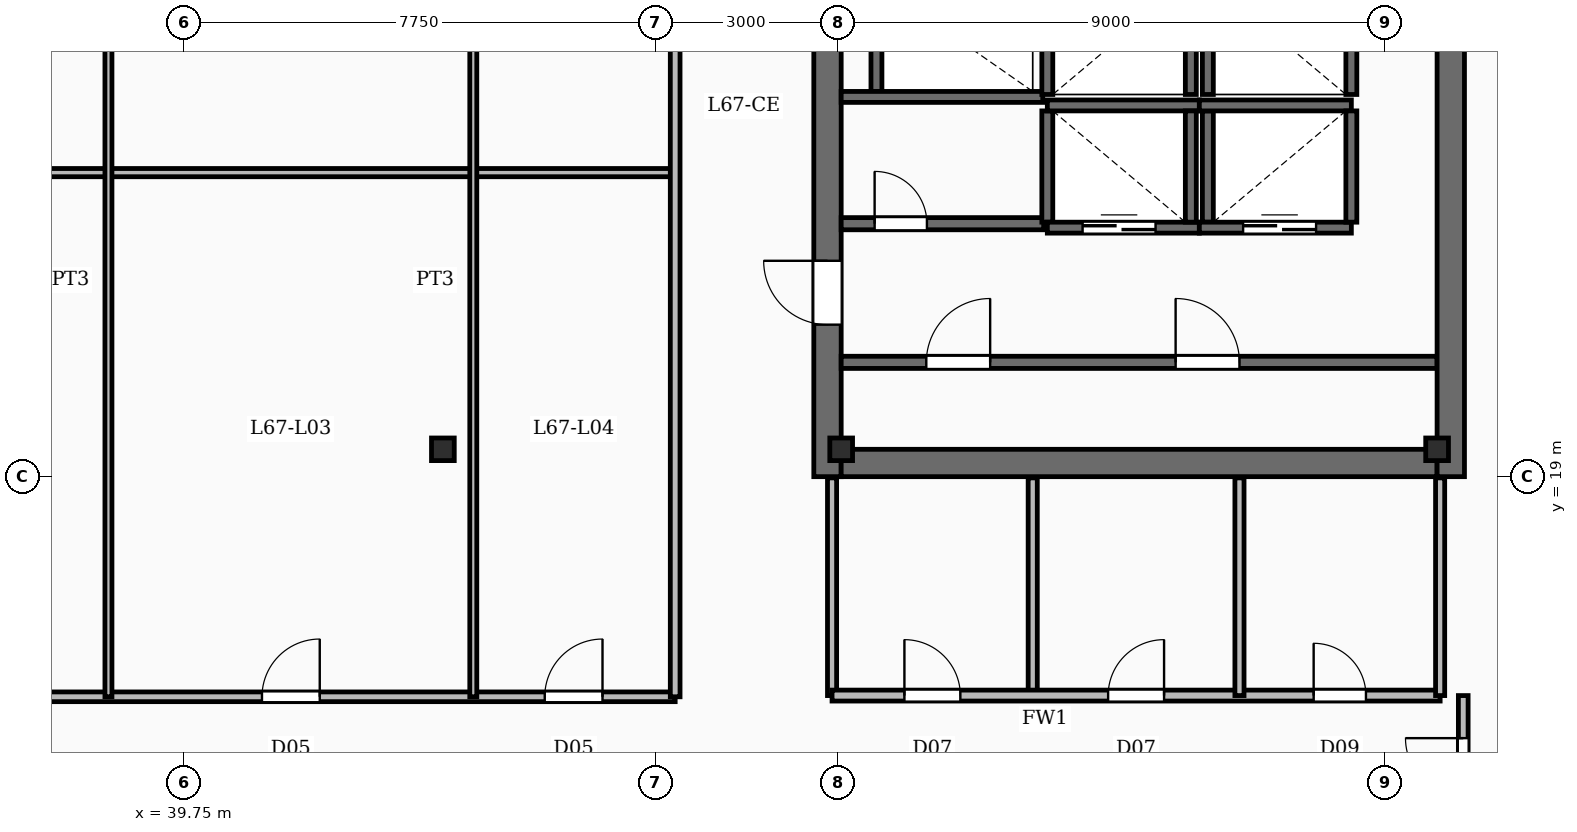
"""IFC4 building model, lengths in metres.
Left out: names, types, materials, properties, quantities, classifications, styles, units other than length and angle.
Written with IfcOpenShell. Run it as: python <this file> out.ifc"""

import sys

from ifc_helpers import new_model, si_unit, direction, frame, frame_2d, origin, origin_2d, place, context, subcontext, project, spatial, rectangle, i_section, extrude, element, fill, save


model = new_model("IFC4")
c1 = context("Model", 3, precision=1e-05, world=origin(), true_north=direction((0.0, 1.0)))
c2 = subcontext(c1, "Body", "Model", "MODEL_VIEW")
j1 = project(units=[si_unit("LENGTHUNIT", "METRE"), si_unit("PLANEANGLEUNIT", "RADIAN")], contexts=[c1])
p1 = place(None, origin())
s1 = spatial("IfcSite", under=j1, at=p1, CompositionType="ELEMENT")
p2 = place(p1, origin())
s2 = spatial("IfcBuilding", under=s1, at=p2, CompositionType="ELEMENT")
p3 = place(p2, frame((0.0, 0.0, 274.9)))
s3 = spatial("IfcBuildingStorey", under=s2, at=p3, CompositionType="ELEMENT", Elevation=274.9)
p4 = place(p3, frame((50.325, 19.0, -0.45), z_axis=(0.0, 0.0, 1.0), x_axis=(0.0, 1.0, 0.0)))
e1 = element("IfcWall", 1, at=p4, inside=s3, PredefinedType="SHEAR", context=c2, shape_type="SweptSolid", body=[
    extrude(rectangle(XDim=20.8, YDim=0.45, at=frame_2d((10.4, 0.0))), origin(), (0.0, 0.0, 1.0), 3.93),
])
p5 = place(p4, frame((2.5, 0.0, 0.45)))
e2 = element("IfcOpeningElement", 2, at=p5, cuts=e1, PredefinedType="OPENING", context=c2, shape_type="SweptSolid", body=[
    extrude(rectangle(XDim=1.05, YDim=2.15, at=frame_2d((0.525, 1.075))), frame((0.0, 0.235, 0.0), z_axis=(0.0, -1.0, 0.0), x_axis=(1.0, 0.0, 0.0)), (0.0, 0.0, 1.0), 0.47),
])
p6 = place(p4, frame((8.65, 0.0, 0.45)))
e3 = element("IfcOpeningElement", 3, at=p6, cuts=e1, PredefinedType="OPENING", context=c2, shape_type="SweptSolid", body=[
    extrude(rectangle(XDim=1.05, YDim=2.15, at=frame_2d((0.525, 1.075))), frame((0.0, 0.235, 0.0), z_axis=(0.0, -1.0, 0.0), x_axis=(1.0, 0.0, 0.0)), (0.0, 0.0, 1.0), 0.47),
])
p7 = place(p4, frame((14.62, 0.0, 0.45)))
e4 = element("IfcOpeningElement", 4, at=p7, cuts=e1, PredefinedType="OPENING", context=c2, shape_type="SweptSolid", body=[
    extrude(rectangle(XDim=1.1, YDim=2.15, at=frame_2d((0.55, 1.075))), frame((0.0, 0.235, 0.0), z_axis=(0.0, -1.0, 0.0), x_axis=(1.0, 0.0, 0.0)), (0.0, 0.0, 1.0), 0.47),
])
p8 = place(p3, frame((60.575, 19.0, -0.45), z_axis=(0.0, 0.0, 1.0), x_axis=(0.0, 1.0, 0.0)))
e5 = element("IfcWall", 5, at=p8, inside=s3, PredefinedType="SHEAR", context=c2, shape_type="SweptSolid", body=[
    extrude(rectangle(XDim=20.8, YDim=0.45, at=frame_2d((10.4, 0.0))), origin(), (0.0, 0.0, 1.0), 3.93),
])
p9 = place(p3, frame((50.55, 19.225, -0.45), z_axis=(0.0, 0.0, 1.0), x_axis=(1.0, 0.0, 0.0)))
e6 = element("IfcWall", 6, at=p9, inside=s3, PredefinedType="SHEAR", context=c2, shape_type="SweptSolid", body=[
    extrude(rectangle(XDim=9.8, YDim=0.45, at=frame_2d((4.9, 0.0))), origin(), (0.0, 0.0, 1.0), 3.93),
])
for number, where, z_axis, x_axis in (
    (7, (50.55, 19.45, -0.45), (0.0, 0.0, 1.0), (1.0, 0.0, 0.0)),
    (8, (60.35, 19.45, -0.45), (0.0, 0.0, 1.0), (1.0, 0.0, 0.0)),
    (9, (44.0, 19.45, -0.45), (0.0, 0.0, 1.0), (1.0, 0.0, 0.0)),
):
    element("IfcColumn", number, at=place(p3, frame(where, z_axis=z_axis, x_axis=x_axis)), inside=s3, PredefinedType="COLUMN", context=c2, shape_type="SweptSolid", body=[
        extrude(i_section(OverallWidth=0.374, OverallDepth=0.372, WebThickness=0.016, FlangeThickness=0.026, FilletRadius=0.02, at=origin_2d()), origin(), (0.0, 0.0, 1.0), 3.93),
    ])
p10 = place(p3, frame((53.94, 25.105, 0.0), z_axis=(0.0, 0.0, 1.0), x_axis=(1.0, 0.0, 0.0)))
e10 = element("IfcWall", 10, at=p10, inside=s3, PredefinedType="SOLIDWALL", context=c2, shape_type="SweptSolid", body=[
    extrude(rectangle(XDim=2.5, YDim=0.18, at=frame_2d((1.25, 0.0))), origin(), (0.0, 0.0, 1.0), 3.48),
])
p11 = place(p3, frame((53.94, 23.095, 0.0), z_axis=(0.0, 0.0, 1.0), x_axis=(1.0, 0.0, 0.0)))
e11 = element("IfcWall", 11, at=p11, inside=s3, PredefinedType="SOLIDWALL", context=c2, shape_type="SweptSolid", body=[
    extrude(rectangle(XDim=2.5, YDim=0.18, at=frame_2d((1.25, 0.0))), origin(), (0.0, 0.0, 1.0), 3.48),
])
p12 = place(p11, frame((0.58, 0.0, 0.0)))
e12 = element("IfcOpeningElement", 12, at=p12, cuts=e11, PredefinedType="OPENING", context=c2, shape_type="SweptSolid", body=[
    extrude(rectangle(XDim=1.2, YDim=2.2, at=frame_2d((0.6, 1.1))), frame((0.0, 0.1, 0.0), z_axis=(0.0, -1.0, 0.0), x_axis=(1.0, 0.0, 0.0)), (0.0, 0.0, 1.0), 0.2),
])
for number, where, z_axis, x_axis in (
    (13, (53.94, 23.185, 0.0), (0.0, 0.0, 1.0), (0.0, 1.0, 0.0)),
    (14, (56.3, 23.185, 0.0), (0.0, 0.0, 1.0), (0.0, 1.0, 0.0)),
):
    element("IfcWall", number, at=place(p3, frame(where, z_axis=z_axis, x_axis=x_axis)), inside=s3, PredefinedType="SOLIDWALL", context=c2, shape_type="SweptSolid", body=[
        extrude(rectangle(XDim=1.83, YDim=0.18, at=frame_2d((0.915, 0.0))), origin(), (0.0, 0.0, 1.0), 3.48),
    ])
p13 = place(p3, frame((56.44, 25.105, 0.0), z_axis=(0.0, 0.0, 1.0), x_axis=(1.0, 0.0, 0.0)))
e15 = element("IfcWall", 15, at=p13, inside=s3, PredefinedType="SOLIDWALL", context=c2, shape_type="SweptSolid", body=[
    extrude(rectangle(XDim=2.5, YDim=0.18, at=frame_2d((1.25, 0.0))), origin(), (0.0, 0.0, 1.0), 3.48),
])
p14 = place(p3, frame((56.44, 23.095, 0.0), z_axis=(0.0, 0.0, 1.0), x_axis=(1.0, 0.0, 0.0)))
e16 = element("IfcWall", 16, at=p14, inside=s3, PredefinedType="SOLIDWALL", context=c2, shape_type="SweptSolid", body=[
    extrude(rectangle(XDim=2.5, YDim=0.18, at=frame_2d((1.25, 0.0))), origin(), (0.0, 0.0, 1.0), 3.48),
])
p15 = place(p14, frame((0.72, 0.0, 0.0)))
e17 = element("IfcOpeningElement", 17, at=p15, cuts=e16, PredefinedType="OPENING", context=c2, shape_type="SweptSolid", body=[
    extrude(rectangle(XDim=1.2, YDim=2.2, at=frame_2d((0.6, 1.1))), frame((0.0, 0.1, 0.0), z_axis=(0.0, -1.0, 0.0), x_axis=(1.0, 0.0, 0.0)), (0.0, 0.0, 1.0), 0.2),
])
for number, where, z_axis, x_axis in (
    (18, (56.58, 23.185, 0.0), (0.0, 0.0, 1.0), (0.0, 1.0, 0.0)),
    (19, (58.94, 23.185, 0.0), (0.0, 0.0, 1.0), (0.0, 1.0, 0.0)),
):
    element("IfcWall", number, at=place(p3, frame(where, z_axis=z_axis, x_axis=x_axis)), inside=s3, PredefinedType="SOLIDWALL", context=c2, shape_type="SweptSolid", body=[
        extrude(rectangle(XDim=1.83, YDim=0.18, at=frame_2d((0.915, 0.0))), origin(), (0.0, 0.0, 1.0), 3.48),
    ])
for number, where, z_axis, x_axis in (
    (20, (53.94, 25.285, 0.0), (0.0, 0.0, 1.0), (0.0, 1.0, 0.0)),
    (21, (56.3, 25.285, 0.0), (0.0, 0.0, 1.0), (0.0, 1.0, 0.0)),
    (22, (56.58, 25.285, 0.0), (0.0, 0.0, 1.0), (0.0, 1.0, 0.0)),
    (23, (58.94, 25.285, 0.0), (0.0, 0.0, 1.0), (0.0, 1.0, 0.0)),
):
    element("IfcWall", number, at=place(p3, frame(where, z_axis=z_axis, x_axis=x_axis)), inside=s3, PredefinedType="SOLIDWALL", context=c2, shape_type="SweptSolid", body=[
        extrude(rectangle(XDim=1.83, YDim=0.18, at=frame_2d((0.915, 0.0))), origin(), (0.0, 0.0, 1.0), 3.48),
    ])
p16 = place(p3, frame((50.55, 25.245, 0.0), z_axis=(0.0, 0.0, 1.0), x_axis=(1.0, 0.0, 0.0)))
e24 = element("IfcWall", 24, at=p16, inside=s3, PredefinedType="SOLIDWALL", context=c2, shape_type="SweptSolid", body=[
    extrude(rectangle(XDim=3.315, YDim=0.18, at=frame_2d((1.657, 0.0))), origin(), (0.0, 0.0, 1.0), 3.48),
])
p17 = place(p3, frame((51.13, 25.335, 0.0), z_axis=(0.0, 0.0, 1.0), x_axis=(0.0, 1.0, 0.0)))
e25 = element("IfcWall", 25, at=p17, inside=s3, PredefinedType="SOLIDWALL", context=c2, shape_type="SweptSolid", body=[
    extrude(rectangle(XDim=1.73, YDim=0.18, at=frame_2d((0.865, 0.0))), origin(), (0.0, 0.0, 1.0), 3.48),
])
p18 = place(p3, frame((50.55, 20.88, 0.0), z_axis=(0.0, 0.0, 1.0), x_axis=(1.0, 0.0, 0.0)))
e26 = element("IfcWall", 26, at=p18, inside=s3, PredefinedType="SOLIDWALL", context=c2, shape_type="SweptSolid", body=[
    extrude(rectangle(XDim=9.8, YDim=0.2, at=frame_2d((4.9, 0.0))), origin(), (0.0, 0.0, 1.0), 2.54),
])
p19 = place(p18, frame((1.4, 0.0, 0.0)))
e27 = element("IfcOpeningElement", 27, at=p19, cuts=e26, PredefinedType="OPENING", context=c2, shape_type="SweptSolid", body=[
    extrude(rectangle(XDim=1.05, YDim=2.15, at=frame_2d((0.525, 1.075))), frame((0.0, 0.11, 0.0), z_axis=(0.0, -1.0, 0.0), x_axis=(1.0, 0.0, 0.0)), (0.0, 0.0, 1.0), 0.22),
])
p20 = place(p18, frame((5.5, 0.0, 0.0)))
e28 = element("IfcOpeningElement", 28, at=p20, cuts=e26, PredefinedType="OPENING", context=c2, shape_type="SweptSolid", body=[
    extrude(rectangle(XDim=1.05, YDim=2.15, at=frame_2d((0.525, 1.075))), frame((0.0, 0.11, 0.0), z_axis=(0.0, -1.0, 0.0), x_axis=(1.0, 0.0, 0.0)), (0.0, 0.0, 1.0), 0.22),
])
p21 = place(p3, frame((50.55, 23.16, 0.0), z_axis=(0.0, 0.0, 1.0), x_axis=(1.0, 0.0, 0.0)))
e29 = element("IfcWall", 29, at=p21, inside=s3, PredefinedType="SOLIDWALL", context=c2, shape_type="SweptSolid", body=[
    extrude(rectangle(XDim=3.33, YDim=0.2, at=frame_2d((1.665, 0.0))), origin(), (0.0, 0.0, 1.0), 2.54),
])
p22 = place(p21, frame((0.55, 0.0, 0.0)))
e30 = element("IfcOpeningElement", 30, at=p22, cuts=e29, PredefinedType="OPENING", context=c2, shape_type="SweptSolid", body=[
    extrude(rectangle(XDim=0.86, YDim=2.05, at=frame_2d((0.43, 1.025))), frame((0.0, 0.11, 0.0), z_axis=(0.0, -1.0, 0.0), x_axis=(1.0, 0.0, 0.0)), (0.0, 0.0, 1.0), 0.22),
])
for number, where, z_axis, x_axis in (
    (31, (53.7, 15.4, 0.0), (0.0, 0.0, 1.0), (0.0, 1.0, 0.0)),
    (32, (57.1, 15.4, 0.0), (0.0, 0.0, 1.0), (0.0, 1.0, 0.0)),
):
    element("IfcWall", number, at=place(p3, frame(where, z_axis=z_axis, x_axis=x_axis)), inside=s3, PredefinedType="PARTITIONING", context=c2, shape_type="SweptSolid", body=[
        extrude(rectangle(XDim=3.58, YDim=0.15, at=frame_2d((1.79, 0.0))), origin(), (0.0, 0.0, 1.0), 2.54),
    ])
p23 = place(p3, frame((50.4, 15.4, 0.0), z_axis=(0.0, 0.0, 1.0), x_axis=(1.0, 0.0, 0.0)))
e33 = element("IfcWall", 33, at=p23, inside=s3, PredefinedType="SOLIDWALL", context=c2, shape_type="SweptSolid", body=[
    extrude(rectangle(XDim=10.0, YDim=0.18, at=frame_2d((5.0, 0.0))), origin(), (0.0, 0.0, 1.0), 2.54),
])
p24 = place(p23, frame((1.19, 0.0, 0.0)))
e34 = element("IfcOpeningElement", 34, at=p24, cuts=e33, PredefinedType="OPENING", context=c2, shape_type="SweptSolid", body=[
    extrude(rectangle(XDim=0.92, YDim=2.1, at=frame_2d((0.46, 1.05))), frame((0.0, 0.1, 0.0), z_axis=(0.0, -1.0, 0.0), x_axis=(1.0, 0.0, 0.0)), (0.0, 0.0, 1.0), 0.2),
])
p25 = place(p23, frame((4.54, 0.0, 0.0)))
e35 = element("IfcOpeningElement", 35, at=p25, cuts=e33, PredefinedType="OPENING", context=c2, shape_type="SweptSolid", body=[
    extrude(rectangle(XDim=0.92, YDim=2.1, at=frame_2d((0.46, 1.05))), frame((0.0, 0.1, 0.0), z_axis=(0.0, -1.0, 0.0), x_axis=(1.0, 0.0, 0.0)), (0.0, 0.0, 1.0), 0.2),
])
p26 = place(p23, frame((7.92, 0.0, 0.0)))
e36 = element("IfcOpeningElement", 36, at=p26, cuts=e33, PredefinedType="OPENING", context=c2, shape_type="SweptSolid", body=[
    extrude(rectangle(XDim=0.86, YDim=2.05, at=frame_2d((0.43, 1.025))), frame((0.0, 0.1, 0.0), z_axis=(0.0, -1.0, 0.0), x_axis=(1.0, 0.0, 0.0)), (0.0, 0.0, 1.0), 0.2),
])
for number, where, z_axis, x_axis in (
    (37, (50.4, 15.4, 0.0), (0.0, 0.0, 1.0), (0.0, 1.0, 0.0)),
    (38, (60.4, 15.4, 0.0), (0.0, 0.0, 1.0), (0.0, 1.0, 0.0)),
):
    element("IfcWall", number, at=place(p3, frame(where, z_axis=z_axis, x_axis=x_axis)), inside=s3, PredefinedType="PARTITIONING", context=c2, shape_type="SweptSolid", body=[
        extrude(rectangle(XDim=3.58, YDim=0.15, at=frame_2d((1.79, 0.0))), origin(), (0.0, 0.0, 1.0), 2.54),
    ])
for number, where, z_axis, x_axis in (
    (39, (38.5, 15.38, 0.0), (0.0, 0.0, 1.0), (0.0, 1.0, 0.0)),
    (40, (44.5, 15.38, 0.0), (0.0, 0.0, 1.0), (0.0, 1.0, 0.0)),
):
    element("IfcWall", number, at=place(p3, frame(where, z_axis=z_axis, x_axis=x_axis)), inside=s3, PredefinedType="PARTITIONING", context=c2, shape_type="SweptSolid", body=[
        extrude(rectangle(XDim=19.6, YDim=0.115, at=frame_2d((9.8, 0.0))), origin(), (0.0, 0.0, 1.0), 2.54),
    ])
p27 = place(p3, frame((27.08, 24.0, 0.0), z_axis=(0.0, 0.0, 1.0), x_axis=(1.0, 0.0, 0.0)))
e41 = element("IfcWall", 41, at=p27, inside=s3, PredefinedType="PARTITIONING", context=c2, shape_type="SweptSolid", body=[
    extrude(rectangle(XDim=20.74, YDim=0.135, at=frame_2d((10.37, 0.0))), origin(), (0.0, 0.0, 1.0), 2.54),
])
p28 = place(p3, frame((27.08, 15.38, 0.0), z_axis=(0.0, 0.0, 1.0), x_axis=(1.0, 0.0, 0.0)))
e42 = element("IfcWall", 42, at=p28, inside=s3, PredefinedType="PARTITIONING", context=c2, shape_type="SweptSolid", body=[
    extrude(rectangle(XDim=20.74, YDim=0.16, at=frame_2d((10.37, 0.0))), origin(), (0.0, 0.0, 1.0), 2.54),
])
p29 = place(p28, frame((0.995, 0.0, 0.0)))
e43 = element("IfcOpeningElement", 43, at=p29, cuts=e42, PredefinedType="OPENING", context=c2, shape_type="SweptSolid", body=[
    extrude(rectangle(XDim=0.95, YDim=2.15, at=frame_2d((0.475, 1.075))), frame((0.0, 0.09, 0.0), z_axis=(0.0, -1.0, 0.0), x_axis=(1.0, 0.0, 0.0)), (0.0, 0.0, 1.0), 0.18),
])
p30 = place(p28, frame((6.695, 0.0, 0.0)))
e44 = element("IfcOpeningElement", 44, at=p30, cuts=e42, PredefinedType="OPENING", context=c2, shape_type="SweptSolid", body=[
    extrude(rectangle(XDim=0.95, YDim=2.15, at=frame_2d((0.475, 1.075))), frame((0.0, 0.09, 0.0), z_axis=(0.0, -1.0, 0.0), x_axis=(1.0, 0.0, 0.0)), (0.0, 0.0, 1.0), 0.18),
])
p31 = place(p28, frame((13.945, 0.0, 0.0)))
e45 = element("IfcOpeningElement", 45, at=p31, cuts=e42, PredefinedType="OPENING", context=c2, shape_type="SweptSolid", body=[
    extrude(rectangle(XDim=0.95, YDim=2.15, at=frame_2d((0.475, 1.075))), frame((0.0, 0.09, 0.0), z_axis=(0.0, -1.0, 0.0), x_axis=(1.0, 0.0, 0.0)), (0.0, 0.0, 1.0), 0.18),
])
p32 = place(p28, frame((18.595, 0.0, 0.0)))
e46 = element("IfcOpeningElement", 46, at=p32, cuts=e42, PredefinedType="OPENING", context=c2, shape_type="SweptSolid", body=[
    extrude(rectangle(XDim=0.95, YDim=2.15, at=frame_2d((0.475, 1.075))), frame((0.0, 0.09, 0.0), z_axis=(0.0, -1.0, 0.0), x_axis=(1.0, 0.0, 0.0)), (0.0, 0.0, 1.0), 0.18),
])
p33 = place(p3, frame((47.82, 15.38, 0.0), z_axis=(0.0, 0.0, 1.0), x_axis=(0.0, 1.0, 0.0)))
e47 = element("IfcWall", 47, at=p33, inside=s3, PredefinedType="PARTITIONING", context=c2, shape_type="SweptSolid", body=[
    extrude(rectangle(XDim=19.6, YDim=0.16, at=frame_2d((9.8, 0.0))), origin(), (0.0, 0.0, 1.0), 2.54),
])
p34 = place(p3, frame((60.78, 13.1, 0.0), z_axis=(0.0, 0.0, 1.0), x_axis=(0.0, 1.0, 0.0)))
e48 = element("IfcWall", 48, at=p34, inside=s3, PredefinedType="PARTITIONING", context=c2, shape_type="SweptSolid", body=[
    extrude(rectangle(XDim=2.3, YDim=0.16, at=frame_2d((1.15, 0.0))), origin(), (0.0, 0.0, 1.0), 2.54),
])
p35 = place(p34, frame((0.65, 0.0, 0.0)))
e49 = element("IfcOpeningElement", 49, at=p35, cuts=e48, PredefinedType="OPENING", context=c2, shape_type="SweptSolid", body=[
    extrude(rectangle(XDim=0.95, YDim=2.15, at=frame_2d((0.475, 1.075))), frame((0.0, 0.09, 0.0), z_axis=(0.0, -1.0, 0.0), x_axis=(1.0, 0.0, 0.0)), (0.0, 0.0, 1.0), 0.18),
])
p36 = place(p5, origin())
e50 = element("IfcDoor", 50, at=p36, inside=s3, OperationType="SINGLE_SWING_RIGHT", PredefinedType="DOOR", context=c2, shape_type="SweptSolid", body=[
    extrude(rectangle(XDim=1.05, YDim=2.15, at=frame_2d((0.525, 1.075))), frame((0.0, 0.025, 0.0), z_axis=(0.0, -1.0, 0.0), x_axis=(1.0, 0.0, 0.0)), (0.0, 0.0, 1.0), 0.05),
])
fill(e2, e50)
p37 = place(p12, origin())
e51 = element("IfcDoor", 51, at=p37, inside=s3, OperationType="DOUBLE_DOOR_SLIDING", PredefinedType="DOOR", context=c2, shape_type="SweptSolid", body=[
    extrude(rectangle(XDim=1.2, YDim=2.2, at=frame_2d((0.6, 1.1))), frame((0.0, 0.025, 0.0), z_axis=(0.0, -1.0, 0.0), x_axis=(1.0, 0.0, 0.0)), (0.0, 0.0, 1.0), 0.05),
])
fill(e12, e51)
p38 = place(p15, origin())
e52 = element("IfcDoor", 52, at=p38, inside=s3, OperationType="DOUBLE_DOOR_SLIDING", PredefinedType="DOOR", context=c2, shape_type="SweptSolid", body=[
    extrude(rectangle(XDim=1.2, YDim=2.2, at=frame_2d((0.6, 1.1))), frame((0.0, 0.025, 0.0), z_axis=(0.0, -1.0, 0.0), x_axis=(1.0, 0.0, 0.0)), (0.0, 0.0, 1.0), 0.05),
])
fill(e17, e52)
p39 = place(p19, origin())
e53 = element("IfcDoor", 53, at=p39, inside=s3, OperationType="SINGLE_SWING_RIGHT", PredefinedType="DOOR", context=c2, shape_type="SweptSolid", body=[
    extrude(rectangle(XDim=1.05, YDim=2.15, at=frame_2d((0.525, 1.075))), frame((0.0, 0.025, 0.0), z_axis=(0.0, -1.0, 0.0), x_axis=(1.0, 0.0, 0.0)), (0.0, 0.0, 1.0), 0.05),
])
fill(e27, e53)
p40 = place(p20, origin())
e54 = element("IfcDoor", 54, at=p40, inside=s3, OperationType="SINGLE_SWING_LEFT", PredefinedType="DOOR", context=c2, shape_type="SweptSolid", body=[
    extrude(rectangle(XDim=1.05, YDim=2.15, at=frame_2d((0.525, 1.075))), frame((0.0, 0.025, 0.0), z_axis=(0.0, -1.0, 0.0), x_axis=(1.0, 0.0, 0.0)), (0.0, 0.0, 1.0), 0.05),
])
fill(e28, e54)
p41 = place(p22, origin())
e55 = element("IfcDoor", 55, at=p41, inside=s3, OperationType="SINGLE_SWING_LEFT", PredefinedType="DOOR", context=c2, shape_type="SweptSolid", body=[
    extrude(rectangle(XDim=0.86, YDim=2.05, at=frame_2d((0.43, 1.025))), frame((0.0, 0.025, 0.0), z_axis=(0.0, -1.0, 0.0), x_axis=(1.0, 0.0, 0.0)), (0.0, 0.0, 1.0), 0.05),
])
fill(e30, e55)
p42 = place(p24, origin())
e56 = element("IfcDoor", 56, at=p42, inside=s3, OperationType="SINGLE_SWING_LEFT", PredefinedType="DOOR", context=c2, shape_type="SweptSolid", body=[
    extrude(rectangle(XDim=0.92, YDim=2.1, at=frame_2d((0.46, 1.05))), frame((0.0, 0.025, 0.0), z_axis=(0.0, -1.0, 0.0), x_axis=(1.0, 0.0, 0.0)), (0.0, 0.0, 1.0), 0.05),
])
fill(e34, e56)
p43 = place(p25, origin())
e57 = element("IfcDoor", 57, at=p43, inside=s3, OperationType="SINGLE_SWING_RIGHT", PredefinedType="DOOR", context=c2, shape_type="SweptSolid", body=[
    extrude(rectangle(XDim=0.92, YDim=2.1, at=frame_2d((0.46, 1.05))), frame((0.0, 0.025, 0.0), z_axis=(0.0, -1.0, 0.0), x_axis=(1.0, 0.0, 0.0)), (0.0, 0.0, 1.0), 0.05),
])
fill(e35, e57)
p44 = place(p26, origin())
e58 = element("IfcDoor", 58, at=p44, inside=s3, OperationType="SINGLE_SWING_LEFT", PredefinedType="DOOR", context=c2, shape_type="SweptSolid", body=[
    extrude(rectangle(XDim=0.86, YDim=2.05, at=frame_2d((0.43, 1.025))), frame((0.0, 0.025, 0.0), z_axis=(0.0, -1.0, 0.0), x_axis=(1.0, 0.0, 0.0)), (0.0, 0.0, 1.0), 0.05),
])
fill(e36, e58)
p45 = place(p31, origin())
e59 = element("IfcDoor", 59, at=p45, inside=s3, OperationType="SINGLE_SWING_RIGHT", PredefinedType="DOOR", context=c2, shape_type="SweptSolid", body=[
    extrude(rectangle(XDim=0.95, YDim=2.15, at=frame_2d((0.475, 1.075))), frame((0.0, 0.025, 0.0), z_axis=(0.0, -1.0, 0.0), x_axis=(1.0, 0.0, 0.0)), (0.0, 0.0, 1.0), 0.05),
])
fill(e45, e59)
p46 = place(p32, origin())
e60 = element("IfcDoor", 60, at=p46, inside=s3, OperationType="SINGLE_SWING_RIGHT", PredefinedType="DOOR", context=c2, shape_type="SweptSolid", body=[
    extrude(rectangle(XDim=0.95, YDim=2.15, at=frame_2d((0.475, 1.075))), frame((0.0, 0.025, 0.0), z_axis=(0.0, -1.0, 0.0), x_axis=(1.0, 0.0, 0.0)), (0.0, 0.0, 1.0), 0.05),
])
fill(e46, e60)
p47 = place(p35, origin())
e61 = element("IfcDoor", 61, at=p47, inside=s3, OperationType="SINGLE_SWING_RIGHT", PredefinedType="DOOR", context=c2, shape_type="SweptSolid", body=[
    extrude(rectangle(XDim=0.95, YDim=2.15, at=frame_2d((0.475, 1.075))), frame((0.0, 0.025, 0.0), z_axis=(0.0, -1.0, 0.0), x_axis=(1.0, 0.0, 0.0)), (0.0, 0.0, 1.0), 0.05),
])
fill(e49, e61)
save(model, sys.argv[1])
